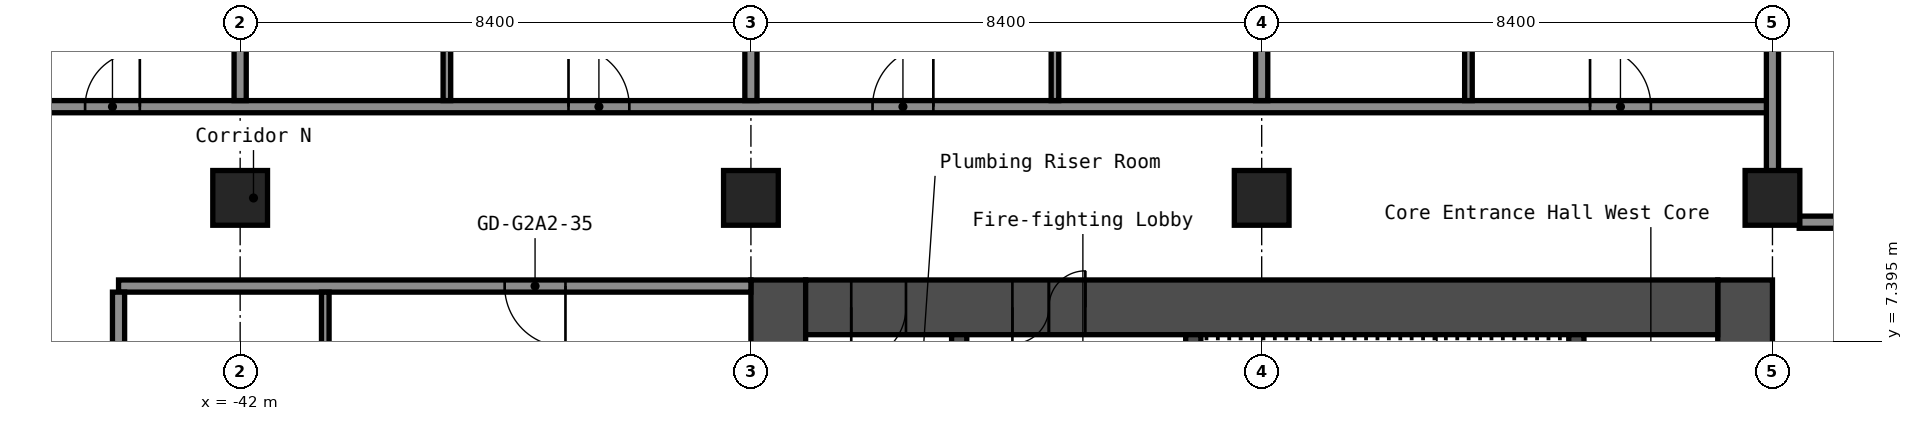
"""IFC4 building model, lengths in metres.
Left out: names, types, materials, properties, quantities, classifications, styles, units other than length and angle.
Written with IfcOpenShell. Run it as: python <this file> out.ifc"""

import sys

from ifc_helpers import new_model, si_unit, direction, frame, frame_2d, origin, origin_2d, place, context, subcontext, project, spatial, rectangle, hollow_rectangle, extrude, element, fill, save


model = new_model("IFC4")
c1 = context("Model", 3, precision=1e-05, world=origin(), true_north=direction((0.0, 1.0)))
c2 = subcontext(c1, "Body", "Model", "MODEL_VIEW")
j1 = project(units=[si_unit("LENGTHUNIT", "METRE"), si_unit("PLANEANGLEUNIT", "RADIAN")], contexts=[c1])
p1 = place(None, origin())
s1 = spatial("IfcSite", under=j1, at=p1, CompositionType="ELEMENT")
p2 = place(p1, origin())
s2 = spatial("IfcBuilding", under=s1, at=p2, CompositionType="ELEMENT")
p3 = place(p2, frame((0.0, 0.0, 107.4)))
s3 = spatial("IfcBuildingStorey", under=s2, at=p3, CompositionType="ELEMENT", Elevation=107.4)
for number, where, z_axis, x_axis in (
    (1, (-42.0, 9.75, 0.0), (0.0, 0.0, 1.0), (1.0, 0.0, 0.0)),
    (2, (-33.6, 9.75, 0.0), (0.0, 0.0, 1.0), (1.0, 0.0, 0.0)),
    (3, (-25.2, 9.75, 0.0), (0.0, 0.0, 1.0), (1.0, 0.0, 0.0)),
    (4, (-16.8, 9.75, 0.0), (0.0, 0.0, 1.0), (1.0, 0.0, 0.0)),
):
    element("IfcColumn", number, at=place(p3, frame(where, z_axis=z_axis, x_axis=x_axis)), inside=s3, PredefinedType="COLUMN", context=c2, shape_type="SweptSolid", body=[
        extrude(hollow_rectangle(XDim=0.9, YDim=0.9, WallThickness=0.036, at=origin_2d()), origin(), (0.0, 0.0, 1.0), 2.8),
    ])
p4 = place(p3, frame((-17.25, -8.4, 0.0), z_axis=(0.0, 0.0, 1.0), x_axis=(0.0, 1.0, 0.0)))
e5 = element("IfcWall", 5, at=p4, inside=s3, PredefinedType="SHEAR", context=c2, shape_type="SweptSolid", body=[
    extrude(rectangle(XDim=16.8, YDim=0.9, at=frame_2d((8.4, 0.0))), origin(), (0.0, 0.0, 1.0), 2.8),
])
p5 = place(p4, frame((7.6, 0.0, 0.0)))
e6 = element("IfcOpeningElement", 6, at=p5, cuts=e5, PredefinedType="OPENING", context=c2, shape_type="SweptSolid", body=[
    extrude(rectangle(XDim=1.2, YDim=2.1, at=frame_2d((0.6, 1.05))), frame((0.0, 0.46, 0.0), z_axis=(0.0, -1.0, 0.0), x_axis=(1.0, 0.0, 0.0)), (0.0, 0.0, 1.0), 0.92),
])
p6 = place(p3, frame((-33.15, -8.4, 0.0), z_axis=(0.0, 0.0, 1.0), x_axis=(0.0, 1.0, 0.0)))
e7 = element("IfcWall", 7, at=p6, inside=s3, PredefinedType="SHEAR", context=c2, shape_type="SweptSolid", body=[
    extrude(rectangle(XDim=16.8, YDim=0.9, at=frame_2d((8.4, 0.0))), origin(), (0.0, 0.0, 1.0), 2.8),
])
p7 = place(p3, frame((-32.7, 7.95, 0.0), z_axis=(0.0, 0.0, 1.0), x_axis=(1.0, 0.0, 0.0)))
e8 = element("IfcWall", 8, at=p7, inside=s3, PredefinedType="SHEAR", context=c2, shape_type="SweptSolid", body=[
    extrude(rectangle(XDim=15.0, YDim=0.9, at=frame_2d((7.5, 0.0))), origin(), (0.0, 0.0, 1.0), 2.8),
])
p8 = place(p7, frame((3.4, 0.0, 0.0)))
e9 = element("IfcOpeningElement", 9, at=p8, cuts=e8, PredefinedType="OPENING", context=c2, shape_type="SweptSolid", body=[
    extrude(rectangle(XDim=1.2, YDim=2.1, at=frame_2d((0.6, 1.05))), frame((0.0, 0.46, 0.0), z_axis=(0.0, -1.0, 0.0), x_axis=(1.0, 0.0, 0.0)), (0.0, 0.0, 1.0), 0.92),
])
p9 = place(p7, frame((0.75, 0.0, 0.0)))
e10 = element("IfcOpeningElement", 10, at=p9, cuts=e8, PredefinedType="OPENING", context=c2, shape_type="SweptSolid", body=[
    extrude(rectangle(XDim=0.9, YDim=2.1, at=frame_2d((0.45, 1.05))), frame((0.0, 0.46, 0.0), z_axis=(0.0, -1.0, 0.0), x_axis=(1.0, 0.0, 0.0)), (0.0, 0.0, 1.0), 0.92),
])
p10 = place(p3, frame((-20.025, 1.2, 0.0), z_axis=(0.0, 0.0, 1.0), x_axis=(0.0, 1.0, 0.0)))
e11 = element("IfcWall", 11, at=p10, inside=s3, PredefinedType="SHEAR", context=c2, shape_type="SweptSolid", body=[
    extrude(rectangle(XDim=6.3, YDim=0.25, at=frame_2d((3.15, 0.0))), origin(), (0.0, 0.0, 1.0), 2.8),
])
p11 = place(p3, frame((-26.325, 3.75, 0.0), z_axis=(0.0, 0.0, 1.0), x_axis=(0.0, 1.0, 0.0)))
e12 = element("IfcWall", 12, at=p11, inside=s3, PredefinedType="SHEAR", context=c2, shape_type="SweptSolid", body=[
    extrude(rectangle(XDim=3.75, YDim=0.25, at=frame_2d((1.875, 0.0))), origin(), (0.0, 0.0, 1.0), 2.8),
])
p12 = place(p11, frame((1.25, 0.0, 0.0)))
e13 = element("IfcOpeningElement", 13, at=p12, cuts=e12, PredefinedType="OPENING", context=c2, shape_type="SweptSolid", body=[
    extrude(rectangle(XDim=1.2, YDim=2.1, at=frame_2d((0.6, 1.05))), frame((0.0, 0.135, 0.0), z_axis=(0.0, -1.0, 0.0), x_axis=(1.0, 0.0, 0.0)), (0.0, 0.0, 1.0), 0.27),
])
p13 = place(p3, frame((-30.175, 1.45, 0.0), z_axis=(0.0, 0.0, 1.0), x_axis=(0.0, 1.0, 0.0)))
e14 = element("IfcWall", 14, at=p13, inside=s3, PredefinedType="SHEAR", context=c2, shape_type="SweptSolid", body=[
    extrude(rectangle(XDim=6.05, YDim=0.25, at=frame_2d((3.025, 0.0))), origin(), (0.0, 0.0, 1.0), 2.8),
])
p14 = place(p13, frame((2.625, 0.0, 0.0)))
e15 = element("IfcOpeningElement", 15, at=p14, cuts=e14, PredefinedType="OPENING", context=c2, shape_type="SweptSolid", body=[
    extrude(rectangle(XDim=1.1, YDim=2.1, at=frame_2d((0.55, 1.05))), frame((0.0, 0.135, 0.0), z_axis=(0.0, -1.0, 0.0), x_axis=(1.0, 0.0, 0.0)), (0.0, 0.0, 1.0), 0.27),
])
p15 = place(p3, frame((-44.0, 8.3, 0.0), z_axis=(0.0, 0.0, 1.0), x_axis=(1.0, 0.0, 0.0)))
e16 = element("IfcWall", 16, at=p15, inside=s3, PredefinedType="PARTITIONING", context=c2, shape_type="SweptSolid", body=[
    extrude(rectangle(XDim=10.4, YDim=0.2, at=frame_2d((5.2, 0.0))), origin(), (0.0, 0.0, 1.0), 2.8),
])
p16 = place(p15, frame((6.35, 0.0, 0.0)))
e17 = element("IfcOpeningElement", 17, at=p16, cuts=e16, PredefinedType="OPENING", context=c2, shape_type="SweptSolid", body=[
    extrude(rectangle(XDim=1.0, YDim=2.1, at=frame_2d((0.5, 1.05))), frame((0.0, 0.11, 0.0), z_axis=(0.0, -1.0, 0.0), x_axis=(1.0, 0.0, 0.0)), (0.0, 0.0, 1.0), 0.22),
])
p17 = place(p3, frame((-16.36, 9.35, 0.0), z_axis=(0.0, 0.0, 1.0), x_axis=(1.0, 0.0, 0.0)))
e18 = element("IfcWall", 18, at=p17, inside=s3, PredefinedType="PARTITIONING", context=c2, shape_type="SweptSolid", body=[
    extrude(rectangle(XDim=32.72, YDim=0.2, at=frame_2d((16.36, 0.0))), origin(), (0.0, 0.0, 1.0), 2.8),
])
p18 = place(p17, frame((3.26, 0.0, 0.0)))
e19 = element("IfcOpeningElement", 19, at=p18, cuts=e18, PredefinedType="OPENING", context=c2, shape_type="SweptSolid", body=[
    extrude(rectangle(XDim=1.0, YDim=2.1, at=frame_2d((0.5, 1.05))), frame((0.0, 0.11, 0.0), z_axis=(0.0, -1.0, 0.0), x_axis=(1.0, 0.0, 0.0)), (0.0, 0.0, 1.0), 0.22),
])
p19 = place(p17, frame((9.36, 0.0, 0.0)))
e20 = element("IfcOpeningElement", 20, at=p19, cuts=e18, PredefinedType="OPENING", context=c2, shape_type="SweptSolid", body=[
    extrude(rectangle(XDim=0.9, YDim=2.1, at=frame_2d((0.45, 1.05))), frame((0.0, 0.11, 0.0), z_axis=(0.0, -1.0, 0.0), x_axis=(1.0, 0.0, 0.0)), (0.0, 0.0, 1.0), 0.22),
])
p20 = place(p17, frame((13.56, 0.0, 0.0)))
e21 = element("IfcOpeningElement", 21, at=p20, cuts=e18, PredefinedType="OPENING", context=c2, shape_type="SweptSolid", body=[
    extrude(rectangle(XDim=0.9, YDim=2.1, at=frame_2d((0.45, 1.05))), frame((0.0, 0.11, 0.0), z_axis=(0.0, -1.0, 0.0), x_axis=(1.0, 0.0, 0.0)), (0.0, 0.0, 1.0), 0.22),
])
p21 = place(p17, frame((18.345, 0.0, 0.0)))
e22 = element("IfcOpeningElement", 22, at=p21, cuts=e18, PredefinedType="OPENING", context=c2, shape_type="SweptSolid", body=[
    extrude(rectangle(XDim=0.9, YDim=2.1, at=frame_2d((0.45, 1.05))), frame((0.0, 0.11, 0.0), z_axis=(0.0, -1.0, 0.0), x_axis=(1.0, 0.0, 0.0)), (0.0, 0.0, 1.0), 0.22),
])
p22 = place(p17, frame((22.545, 0.0, 0.0)))
e23 = element("IfcOpeningElement", 23, at=p22, cuts=e18, PredefinedType="OPENING", context=c2, shape_type="SweptSolid", body=[
    extrude(rectangle(XDim=0.9, YDim=2.1, at=frame_2d((0.45, 1.05))), frame((0.0, 0.11, 0.0), z_axis=(0.0, -1.0, 0.0), x_axis=(1.0, 0.0, 0.0)), (0.0, 0.0, 1.0), 0.22),
])
p23 = place(p17, frame((25.99, 0.0, 0.0)))
e24 = element("IfcOpeningElement", 24, at=p23, cuts=e18, PredefinedType="OPENING", context=c2, shape_type="SweptSolid", body=[
    extrude(rectangle(XDim=0.9, YDim=2.1, at=frame_2d((0.45, 1.05))), frame((0.0, 0.11, 0.0), z_axis=(0.0, -1.0, 0.0), x_axis=(1.0, 0.0, 0.0)), (0.0, 0.0, 1.0), 0.22),
])
p24 = place(p17, frame((30.19, 0.0, 0.0)))
e25 = element("IfcOpeningElement", 25, at=p24, cuts=e18, PredefinedType="OPENING", context=c2, shape_type="SweptSolid", body=[
    extrude(rectangle(XDim=0.9, YDim=2.1, at=frame_2d((0.45, 1.05))), frame((0.0, 0.11, 0.0), z_axis=(0.0, -1.0, 0.0), x_axis=(1.0, 0.0, 0.0)), (0.0, 0.0, 1.0), 0.22),
])
p25 = place(p3, frame((-46.5, 11.25, 0.0), z_axis=(0.0, 0.0, 1.0), x_axis=(1.0, 0.0, 0.0)))
e26 = element("IfcWall", 26, at=p25, inside=s3, PredefinedType="PARTITIONING", context=c2, shape_type="SweptSolid", body=[
    extrude(rectangle(XDim=29.7, YDim=0.2, at=frame_2d((14.85, 0.0))), origin(), (0.0, 0.0, 1.0), 2.8),
])
p26 = place(p25, frame((1.95, 0.0, 0.0)))
e27 = element("IfcOpeningElement", 27, at=p26, cuts=e26, PredefinedType="OPENING", context=c2, shape_type="SweptSolid", body=[
    extrude(rectangle(XDim=0.9, YDim=2.1, at=frame_2d((0.45, 1.05))), frame((0.0, 0.11, 0.0), z_axis=(0.0, -1.0, 0.0), x_axis=(1.0, 0.0, 0.0)), (0.0, 0.0, 1.0), 0.22),
])
p27 = place(p25, frame((9.9, 0.0, 0.0)))
e28 = element("IfcOpeningElement", 28, at=p27, cuts=e26, PredefinedType="OPENING", context=c2, shape_type="SweptSolid", body=[
    extrude(rectangle(XDim=1.0, YDim=2.1, at=frame_2d((0.5, 1.05))), frame((0.0, 0.11, 0.0), z_axis=(0.0, -1.0, 0.0), x_axis=(1.0, 0.0, 0.0)), (0.0, 0.0, 1.0), 0.22),
])
p28 = place(p25, frame((14.9, 0.0, 0.0)))
e29 = element("IfcOpeningElement", 29, at=p28, cuts=e26, PredefinedType="OPENING", context=c2, shape_type="SweptSolid", body=[
    extrude(rectangle(XDim=1.0, YDim=2.1, at=frame_2d((0.5, 1.05))), frame((0.0, 0.11, 0.0), z_axis=(0.0, -1.0, 0.0), x_axis=(1.0, 0.0, 0.0)), (0.0, 0.0, 1.0), 0.22),
])
p29 = place(p25, frame((26.7, 0.0, 0.0)))
e30 = element("IfcOpeningElement", 30, at=p29, cuts=e26, PredefinedType="OPENING", context=c2, shape_type="SweptSolid", body=[
    extrude(rectangle(XDim=1.0, YDim=2.1, at=frame_2d((0.5, 1.05))), frame((0.0, 0.11, 0.0), z_axis=(0.0, -1.0, 0.0), x_axis=(1.0, 0.0, 0.0)), (0.0, 0.0, 1.0), 0.22),
])
p30 = place(p3, frame((-44.0, -8.2, 0.0), z_axis=(0.0, 0.0, 1.0), x_axis=(0.0, 1.0, 0.0)))
e31 = element("IfcWall", 31, at=p30, inside=s3, PredefinedType="PARTITIONING", context=c2, shape_type="SweptSolid", body=[
    extrude(rectangle(XDim=16.4, YDim=0.2, at=frame_2d((8.2, 0.0))), origin(), (0.0, 0.0, 1.0), 2.8),
])
p31 = place(p3, frame((-42.0, 11.35, 0.0), z_axis=(0.0, 0.0, 1.0), x_axis=(0.0, 1.0, 0.0)))
e32 = element("IfcWall", 32, at=p31, inside=s3, PredefinedType="PARTITIONING", context=c2, shape_type="SweptSolid", body=[
    extrude(rectangle(XDim=12.2, YDim=0.2, at=frame_2d((6.1, 0.0))), origin(), (0.0, 0.0, 1.0), 2.8),
])
p32 = place(p3, frame((-40.6, 4.9, 0.0), z_axis=(0.0, 0.0, 1.0), x_axis=(0.0, 1.0, 0.0)))
e33 = element("IfcWall", 33, at=p32, inside=s3, PredefinedType="PARTITIONING", context=c2, shape_type="SweptSolid", body=[
    extrude(rectangle(XDim=3.3, YDim=0.125, at=frame_2d((1.65, 0.0))), origin(), (0.0, 0.0, 1.0), 2.8),
])
p33 = place(p3, frame((-38.6, 11.35, 0.0), z_axis=(0.0, 0.0, 1.0), x_axis=(0.0, 1.0, 0.0)))
e34 = element("IfcWall", 34, at=p33, inside=s3, PredefinedType="PARTITIONING", context=c2, shape_type="SweptSolid", body=[
    extrude(rectangle(XDim=3.3, YDim=0.125, at=frame_2d((1.65, 0.0))), origin(), (0.0, 0.0, 1.0), 2.8),
])
p34 = place(p3, frame((-33.6, 11.35, 0.0), z_axis=(0.0, 0.0, 1.0), x_axis=(0.0, 1.0, 0.0)))
e35 = element("IfcWall", 35, at=p34, inside=s3, PredefinedType="PARTITIONING", context=c2, shape_type="SweptSolid", body=[
    extrude(rectangle(XDim=12.2, YDim=0.2, at=frame_2d((6.1, 0.0))), origin(), (0.0, 0.0, 1.0), 2.8),
])
p35 = place(p3, frame((-28.6, 11.35, 0.0), z_axis=(0.0, 0.0, 1.0), x_axis=(0.0, 1.0, 0.0)))
e36 = element("IfcWall", 36, at=p35, inside=s3, PredefinedType="PARTITIONING", context=c2, shape_type="SweptSolid", body=[
    extrude(rectangle(XDim=3.3, YDim=0.125, at=frame_2d((1.65, 0.0))), origin(), (0.0, 0.0, 1.0), 2.8),
])
p36 = place(p3, frame((-25.2, 11.35, 0.0), z_axis=(0.0, 0.0, 1.0), x_axis=(0.0, 1.0, 0.0)))
e37 = element("IfcWall", 37, at=p36, inside=s3, PredefinedType="PARTITIONING", context=c2, shape_type="SweptSolid", body=[
    extrude(rectangle(XDim=12.2, YDim=0.2, at=frame_2d((6.1, 0.0))), origin(), (0.0, 0.0, 1.0), 2.8),
])
p37 = place(p3, frame((-21.8, 11.35, 0.0), z_axis=(0.0, 0.0, 1.0), x_axis=(0.0, 1.0, 0.0)))
e38 = element("IfcWall", 38, at=p37, inside=s3, PredefinedType="PARTITIONING", context=c2, shape_type="SweptSolid", body=[
    extrude(rectangle(XDim=3.3, YDim=0.125, at=frame_2d((1.65, 0.0))), origin(), (0.0, 0.0, 1.0), 2.8),
])
p38 = place(p3, frame((-16.8, 10.19, 0.0), z_axis=(0.0, 0.0, 1.0), x_axis=(0.0, 1.0, 0.0)))
e39 = element("IfcWall", 39, at=p38, inside=s3, PredefinedType="PARTITIONING", context=c2, shape_type="SweptSolid", body=[
    extrude(rectangle(XDim=13.36, YDim=0.2, at=frame_2d((6.68, 0.0))), origin(), (0.0, 0.0, 1.0), 2.8),
])
p39 = place(p8, origin())
e40 = element("IfcDoor", 40, at=p39, inside=s3, OperationType="DOUBLE_DOOR_SINGLE_SWING", PredefinedType="DOOR", context=c2, shape_type="SweptSolid", body=[
    extrude(rectangle(XDim=1.2, YDim=2.1, at=frame_2d((0.6, 1.05))), frame((0.0, 0.025, 0.0), z_axis=(0.0, -1.0, 0.0), x_axis=(1.0, 0.0, 0.0)), (0.0, 0.0, 1.0), 0.05),
])
fill(e9, e40)
p40 = place(p9, origin())
e41 = element("IfcDoor", 41, at=p40, inside=s3, OperationType="SINGLE_SWING_LEFT", PredefinedType="DOOR", context=c2, shape_type="SweptSolid", body=[
    extrude(rectangle(XDim=0.9, YDim=2.1, at=frame_2d((0.45, 1.05))), frame((0.0, 0.025, 0.0), z_axis=(0.0, -1.0, 0.0), x_axis=(1.0, 0.0, 0.0)), (0.0, 0.0, 1.0), 0.05),
])
fill(e10, e41)
p41 = place(p16, origin())
e42 = element("IfcDoor", 42, at=p41, inside=s3, OperationType="SINGLE_SWING_RIGHT", PredefinedType="DOOR", context=c2, shape_type="SweptSolid", body=[
    extrude(rectangle(XDim=1.0, YDim=2.1, at=frame_2d((0.5, 1.05))), frame((0.0, 0.025, 0.0), z_axis=(0.0, -1.0, 0.0), x_axis=(1.0, 0.0, 0.0)), (0.0, 0.0, 1.0), 0.05),
])
fill(e17, e42)
p42 = place(p26, origin())
e43 = element("IfcDoor", 43, at=p42, inside=s3, OperationType="SINGLE_SWING_LEFT", PredefinedType="DOOR", context=c2, shape_type="SweptSolid", body=[
    extrude(rectangle(XDim=0.9, YDim=2.1, at=frame_2d((0.45, 1.05))), frame((0.0, 0.025, 0.0), z_axis=(0.0, -1.0, 0.0), x_axis=(1.0, 0.0, 0.0)), (0.0, 0.0, 1.0), 0.05),
])
fill(e27, e43)
p43 = place(p27, origin())
e44 = element("IfcDoor", 44, at=p43, inside=s3, OperationType="SINGLE_SWING_RIGHT", PredefinedType="DOOR", context=c2, shape_type="SweptSolid", body=[
    extrude(rectangle(XDim=1.0, YDim=2.1, at=frame_2d((0.5, 1.05))), frame((0.0, 0.025, 0.0), z_axis=(0.0, -1.0, 0.0), x_axis=(1.0, 0.0, 0.0)), (0.0, 0.0, 1.0), 0.05),
])
fill(e28, e44)
p44 = place(p28, origin())
e45 = element("IfcDoor", 45, at=p44, inside=s3, OperationType="SINGLE_SWING_LEFT", PredefinedType="DOOR", context=c2, shape_type="SweptSolid", body=[
    extrude(rectangle(XDim=1.0, YDim=2.1, at=frame_2d((0.5, 1.05))), frame((0.0, 0.025, 0.0), z_axis=(0.0, -1.0, 0.0), x_axis=(1.0, 0.0, 0.0)), (0.0, 0.0, 1.0), 0.05),
])
fill(e29, e45)
p45 = place(p29, origin())
e46 = element("IfcDoor", 46, at=p45, inside=s3, OperationType="SINGLE_SWING_RIGHT", PredefinedType="DOOR", context=c2, shape_type="SweptSolid", body=[
    extrude(rectangle(XDim=1.0, YDim=2.1, at=frame_2d((0.5, 1.05))), frame((0.0, 0.025, 0.0), z_axis=(0.0, -1.0, 0.0), x_axis=(1.0, 0.0, 0.0)), (0.0, 0.0, 1.0), 0.05),
])
fill(e30, e46)
save(model, sys.argv[1])
